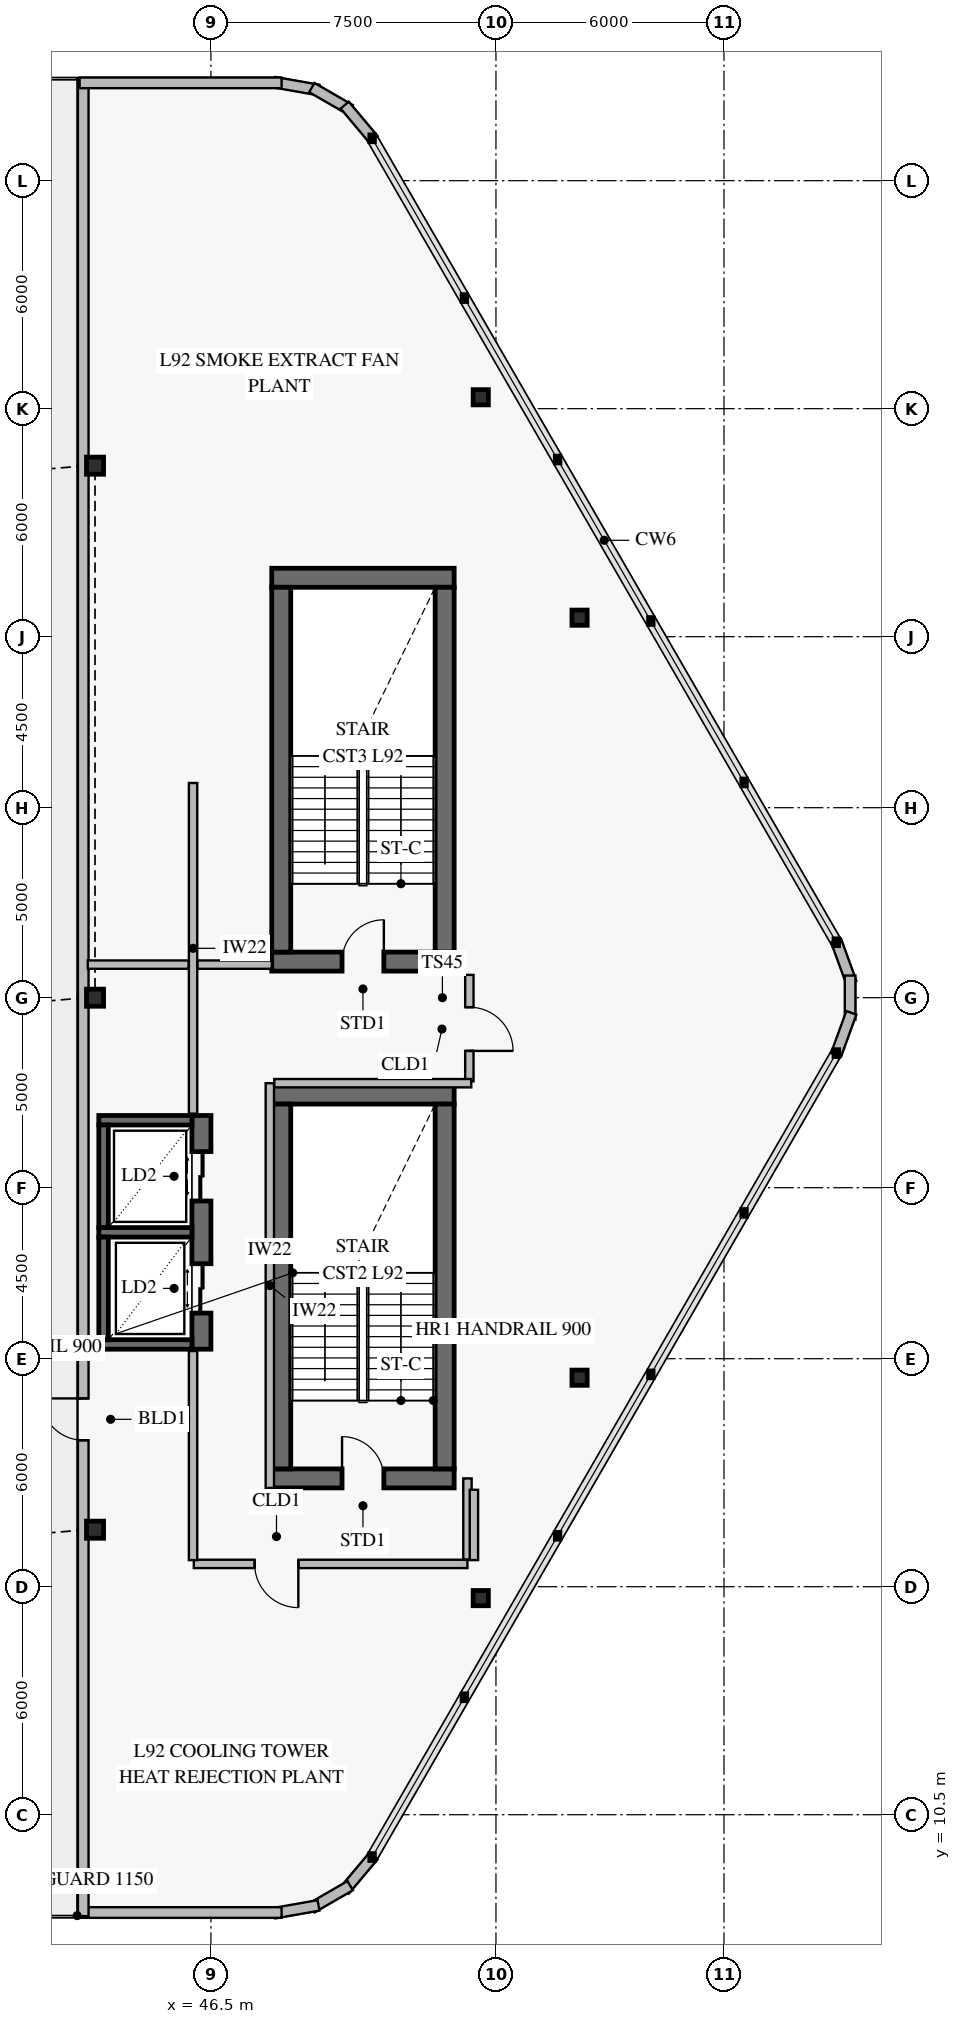
"""IFC4 building model, lengths in metres.
Left out: names, types, materials, properties, quantities, classifications, styles, units other than length and angle.
Written with IfcOpenShell. Run it as: python <this file> out.ifc"""

import sys

from ifc_helpers import new_model, si_unit, direction, frame, frame_2d, origin, origin_2d, place, context, subcontext, project, spatial, rectangle, hollow_rectangle, i_section, extrude, element, fill, save


model = new_model("IFC4")
c1 = context("Model", 3, precision=1e-05, world=origin(), true_north=direction((0.0, 1.0)))
c2 = subcontext(c1, "Body", "Model", "MODEL_VIEW")
j1 = project(units=[si_unit("LENGTHUNIT", "METRE"), si_unit("PLANEANGLEUNIT", "RADIAN")], contexts=[c1])
p1 = place(None, origin())
s1 = spatial("IfcSite", under=j1, at=p1, CompositionType="ELEMENT")
p2 = place(p1, origin())
s2 = spatial("IfcBuilding", under=s1, at=p2, CompositionType="ELEMENT")
p3 = place(p2, frame((0.0, 0.0, 361.4)))
s3 = spatial("IfcBuildingStorey", under=s2, at=p3, CompositionType="ELEMENT", Elevation=361.4)
p4 = place(p3, frame((48.1, 19.35, 0.0), z_axis=(0.0, 0.0, 1.0), x_axis=(1.0, 0.0, 0.0)))
e1 = element("IfcWall", 1, at=p4, inside=s3, PredefinedType="SHEAR", context=c2, shape_type="SweptSolid", body=[
    extrude(rectangle(XDim=4.8, YDim=0.5, at=frame_2d((2.4, 0.0))), origin(), (0.0, 0.0, 1.0), 4.4),
])
p5 = place(p4, frame((1.85, 0.0, 0.0)))
e2 = element("IfcOpeningElement", 2, at=p5, cuts=e1, PredefinedType="OPENING", context=c2, shape_type="SweptSolid", body=[
    extrude(rectangle(XDim=1.1, YDim=2.15, at=frame_2d((0.55, 1.075))), frame((0.0, 0.262, 0.0), z_axis=(0.0, -1.0, 0.0), x_axis=(1.0, 0.0, 0.0)), (0.0, 0.0, 1.0), 0.524),
])
p6 = place(p3, frame((52.9, 29.45, 0.0), z_axis=(0.0, 0.0, 1.0), x_axis=(-1.0, 0.0, 0.0)))
e3 = element("IfcWall", 3, at=p6, inside=s3, PredefinedType="SHEAR", context=c2, shape_type="SweptSolid", body=[
    extrude(rectangle(XDim=4.8, YDim=0.5, at=frame_2d((2.4, 0.0))), origin(), (0.0, 0.0, 1.0), 4.4),
])
for number, where, z_axis, x_axis in (
    (4, (48.35, 19.6, 0.0), (0.0, 0.0, 1.0), (0.0, 1.0, 0.0)),
    (5, (52.65, 29.2, 0.0), (0.0, 0.0, 1.0), (0.0, -1.0, 0.0)),
):
    element("IfcWall", number, at=place(p3, frame(where, z_axis=z_axis, x_axis=x_axis)), inside=s3, PredefinedType="SHEAR", context=c2, shape_type="SweptSolid", body=[
        extrude(rectangle(XDim=9.6, YDim=0.5, at=frame_2d((4.8, 0.0))), origin(), (0.0, 0.0, 1.0), 4.4),
    ])
p7 = place(p3, frame((48.1, 32.95, 0.0), z_axis=(0.0, 0.0, 1.0), x_axis=(1.0, 0.0, 0.0)))
e6 = element("IfcWall", 6, at=p7, inside=s3, PredefinedType="SHEAR", context=c2, shape_type="SweptSolid", body=[
    extrude(rectangle(XDim=4.8, YDim=0.5, at=frame_2d((2.4, 0.0))), origin(), (0.0, 0.0, 1.0), 4.4),
])
p8 = place(p7, frame((1.85, 0.0, 0.0)))
e7 = element("IfcOpeningElement", 7, at=p8, cuts=e6, PredefinedType="OPENING", context=c2, shape_type="SweptSolid", body=[
    extrude(rectangle(XDim=1.1, YDim=2.15, at=frame_2d((0.55, 1.075))), frame((0.0, 0.262, 0.0), z_axis=(0.0, -1.0, 0.0), x_axis=(1.0, 0.0, 0.0)), (0.0, 0.0, 1.0), 0.524),
])
p9 = place(p3, frame((52.9, 43.05, 0.0), z_axis=(0.0, 0.0, 1.0), x_axis=(-1.0, 0.0, 0.0)))
e8 = element("IfcWall", 8, at=p9, inside=s3, PredefinedType="SHEAR", context=c2, shape_type="SweptSolid", body=[
    extrude(rectangle(XDim=4.8, YDim=0.5, at=frame_2d((2.4, 0.0))), origin(), (0.0, 0.0, 1.0), 4.4),
])
for number, where, z_axis, x_axis in (
    (9, (48.35, 33.2, 0.0), (0.0, 0.0, 1.0), (0.0, 1.0, 0.0)),
    (10, (52.65, 42.8, 0.0), (0.0, 0.0, 1.0), (0.0, -1.0, 0.0)),
):
    element("IfcWall", number, at=place(p3, frame(where, z_axis=z_axis, x_axis=x_axis)), inside=s3, PredefinedType="SHEAR", context=c2, shape_type="SweptSolid", body=[
        extrude(rectangle(XDim=9.6, YDim=0.5, at=frame_2d((4.8, 0.0))), origin(), (0.0, 0.0, 1.0), 4.4),
    ])
p10 = place(p3, frame((46.25, 22.75, 0.0), z_axis=(0.0, 0.0, 1.0), x_axis=(0.0, 1.0, 0.0)))
e11 = element("IfcWall", 11, at=p10, inside=s3, PredefinedType="SHEAR", context=c2, shape_type="SweptSolid", body=[
    extrude(rectangle(XDim=6.15, YDim=0.5, at=frame_2d((3.075, 0.0))), origin(), (0.0, 0.0, 1.0), 4.4),
])
p11 = place(p10, frame((0.95, 0.0, 0.0)))
e12 = element("IfcOpeningElement", 12, at=p11, cuts=e11, PredefinedType="OPENING", context=c2, shape_type="SweptSolid", body=[
    extrude(rectangle(XDim=1.3, YDim=2.3, at=frame_2d((0.65, 1.15))), frame((0.0, 0.262, 0.0), z_axis=(0.0, -1.0, 0.0), x_axis=(1.0, 0.0, 0.0)), (0.0, 0.0, 1.0), 0.524),
])
p12 = place(p10, frame((3.9, 0.0, 0.0)))
e13 = element("IfcOpeningElement", 13, at=p12, cuts=e11, PredefinedType="OPENING", context=c2, shape_type="SweptSolid", body=[
    extrude(rectangle(XDim=1.3, YDim=2.3, at=frame_2d((0.65, 1.15))), frame((0.0, 0.262, 0.0), z_axis=(0.0, -1.0, 0.0), x_axis=(1.0, 0.0, 0.0)), (0.0, 0.0, 1.0), 0.524),
])
for number, where, z_axis, x_axis in (
    (14, (56.2, 22.0, 0.0), (0.0, 0.0, 1.0), (1.0, 0.0, 0.0)),
    (15, (56.2, 42.0, 0.0), (0.0, 0.0, 1.0), (1.0, 0.0, 0.0)),
    (16, (53.6, 16.2, 0.0), (0.0, 0.0, 1.0), (1.0, 0.0, 0.0)),
    (17, (53.6, 47.8, 0.0), (0.0, 0.0, 1.0), (1.0, 0.0, 0.0)),
):
    element("IfcColumn", number, at=place(p3, frame(where, z_axis=z_axis, x_axis=x_axis)), inside=s3, PredefinedType="COLUMN", context=c2, shape_type="SweptSolid", body=[
        extrude(i_section(OverallWidth=0.4, OverallDepth=0.4, WebThickness=0.013, FlangeThickness=0.021, at=origin_2d()), origin(), (0.0, 0.0, 1.0), 4.05),
    ])
for number, where, z_axis, x_axis in (
    (18, (43.45, 18.0, 0.0), (0.0, 0.0, 1.0), (1.0, 0.0, 0.0)),
    (19, (43.45, 32.0, 0.0), (0.0, 0.0, 1.0), (1.0, 0.0, 0.0)),
    (20, (43.45, 46.0, 0.0), (0.0, 0.0, 1.0), (1.0, 0.0, 0.0)),
):
    element("IfcColumn", number, at=place(p3, frame(where, z_axis=z_axis, x_axis=x_axis)), inside=s3, PredefinedType="PILASTER", context=c2, shape_type="SweptSolid", body=[
        extrude(hollow_rectangle(XDim=0.45, YDim=0.45, WallThickness=0.022, at=origin_2d()), origin(), (0.0, 0.0, 1.0), 4.05),
    ])
p13 = place(p3, frame((48.171, 56.091, 0.0), z_axis=(0.0, 0.0, 1.0), x_axis=(0.984798162481, -0.173702559495, 0.0)))
e21 = element("IfcWall", 21, at=p13, inside=s3, PredefinedType="SOLIDWALL", context=c2, shape_type="SweptSolid", body=[
    extrude(rectangle(XDim=1.178, YDim=0.28, at=frame_2d((0.589, 0.0))), origin(), (0.0, 0.0, 1.0), 4.05),
])
p14 = place(p3, frame((49.155, 55.95, 0.0), z_axis=(0.0, 0.0, 1.0), x_axis=(0.865951785477, -0.500127488975, 0.0)))
e22 = element("IfcWall", 22, at=p14, inside=s3, PredefinedType="SOLIDWALL", context=c2, shape_type="SweptSolid", body=[
    extrude(rectangle(XDim=1.165, YDim=0.28, at=frame_2d((0.583, 0.0))), origin(), (0.0, 0.0, 1.0), 4.05),
])
for number, where, z_axis, x_axis in (
    (23, (50.021, 55.488, 0.0), (0.0, 0.0, 1.0), (0.643, -0.766, 0.0)),
    (24, (62.948, 33.505, 0.0), (0.0, 0.0, 1.0), (0.342, -0.94, 0.0)),
):
    element("IfcWall", number, at=place(p3, frame(where, z_axis=z_axis, x_axis=x_axis)), inside=s3, PredefinedType="SOLIDWALL", context=c2, shape_type="SweptSolid", body=[
        extrude(rectangle(XDim=1.178, YDim=0.28, at=frame_2d((0.589, 0.0))), origin(), (0.0, 0.0, 1.0), 4.05),
    ])
p15 = place(p3, frame((63.319, 32.583, 0.0), z_axis=(0.0, 0.0, 1.0), x_axis=(0.0, -1.0, 0.0)))
e25 = element("IfcWall", 25, at=p15, inside=s3, PredefinedType="SOLIDWALL", context=c2, shape_type="SweptSolid", body=[
    extrude(rectangle(XDim=1.165, YDim=0.28, at=frame_2d((0.583, 0.0))), origin(), (0.0, 0.0, 1.0), 4.05),
])
for number, where, z_axis, x_axis in (
    (26, (63.351, 31.602, 0.0), (0.0, 0.0, 1.0), (-0.342, -0.94, 0.0)),
    (27, (50.778, 9.414, 0.0), (0.0, 0.0, 1.0), (-0.643, -0.766, 0.0)),
):
    element("IfcWall", number, at=place(p3, frame(where, z_axis=z_axis, x_axis=x_axis)), inside=s3, PredefinedType="SOLIDWALL", context=c2, shape_type="SweptSolid", body=[
        extrude(rectangle(XDim=1.178, YDim=0.28, at=frame_2d((0.589, 0.0))), origin(), (0.0, 0.0, 1.0), 4.05),
    ])
p16 = place(p3, frame((50.164, 8.633, 0.0), z_axis=(0.0, 0.0, 1.0), x_axis=(-0.865951785477, -0.500127488975, 0.0)))
e28 = element("IfcWall", 28, at=p16, inside=s3, PredefinedType="SOLIDWALL", context=c2, shape_type="SweptSolid", body=[
    extrude(rectangle(XDim=1.165, YDim=0.28, at=frame_2d((0.583, 0.0))), origin(), (0.0, 0.0, 1.0), 4.05),
])
p17 = place(p3, frame((49.331, 8.114, 0.0), z_axis=(0.0, 0.0, 1.0), x_axis=(-0.984798162481, -0.173702559495, 0.0)))
e29 = element("IfcWall", 29, at=p17, inside=s3, PredefinedType="SOLIDWALL", context=c2, shape_type="SweptSolid", body=[
    extrude(rectangle(XDim=1.178, YDim=0.28, at=frame_2d((0.589, 0.0))), origin(), (0.0, 0.0, 1.0), 4.05),
])
p18 = place(p3, frame((48.36, 7.926, 0.0), z_axis=(0.0, 0.0, 1.0), x_axis=(-1.0, 0.0, 0.0)))
e30 = element("IfcWall", 30, at=p18, inside=s3, PredefinedType="SOLIDWALL", context=c2, shape_type="SweptSolid", body=[
    extrude(rectangle(XDim=5.315, YDim=0.28, at=frame_2d((2.657, 0.0))), origin(), (0.0, 0.0, 1.0), 4.05),
])
p19 = place(p3, frame((43.14, 7.831, 0.0), z_axis=(0.0, 0.0, 1.0), x_axis=(0.0, 1.0, 0.0)))
e31 = element("IfcWall", 31, at=p19, inside=s3, PredefinedType="SOLIDWALL", context=c2, shape_type="SweptSolid", body=[
    extrude(rectangle(XDim=48.338, YDim=0.28, at=frame_2d((24.169, 0.0))), origin(), (0.0, 0.0, 1.0), 3.465),
])
p20 = place(p19, frame((12.524, 0.0, 0.0)))
e32 = element("IfcOpeningElement", 32, at=p20, cuts=e31, PredefinedType="OPENING", context=c2, shape_type="SweptSolid", body=[
    extrude(rectangle(XDim=1.1, YDim=2.2, at=frame_2d((0.55, 1.1))), frame((0.0, 0.152, 0.0), z_axis=(0.0, -1.0, 0.0), x_axis=(1.0, 0.0, 0.0)), (0.0, 0.0, 1.0), 0.304),
])
p21 = place(p3, frame((43.045, 56.074, 0.0), z_axis=(0.0, 0.0, 1.0), x_axis=(1.0, 0.0, 0.0)))
e33 = element("IfcWall", 33, at=p21, inside=s3, PredefinedType="SOLIDWALL", context=c2, shape_type="SweptSolid", body=[
    extrude(rectangle(XDim=5.315, YDim=0.28, at=frame_2d((2.657, 0.0))), origin(), (0.0, 0.0, 1.0), 4.05),
])
for number, where, z_axis, x_axis in (
    (34, (43.55, 22.875, 0.0), (0.0, 0.0, 1.0), (1.0, 0.0, 0.0)),
    (35, (43.55, 25.825, 0.0), (0.0, 0.0, 1.0), (1.0, 0.0, 0.0)),
):
    element("IfcWall", number, at=place(p3, frame(where, z_axis=z_axis, x_axis=x_axis)), inside=s3, PredefinedType="SOLIDWALL", context=c2, shape_type="SweptSolid", body=[
        extrude(rectangle(XDim=2.45, YDim=0.25, at=frame_2d((1.225, 0.0))), origin(), (0.0, 0.0, 1.0), 4.4),
    ])
p22 = place(p3, frame((43.675, 23.0, 0.0), z_axis=(0.0, 0.0, 1.0), x_axis=(0.0, 1.0, 0.0)))
e36 = element("IfcWall", 36, at=p22, inside=s3, PredefinedType="SOLIDWALL", context=c2, shape_type="SweptSolid", body=[
    extrude(rectangle(XDim=2.7, YDim=0.25, at=frame_2d((1.35, 0.0))), origin(), (0.0, 0.0, 1.0), 4.4),
])
p23 = place(p3, frame((43.55, 28.775, 0.0), z_axis=(0.0, 0.0, 1.0), x_axis=(1.0, 0.0, 0.0)))
e37 = element("IfcWall", 37, at=p23, inside=s3, PredefinedType="SOLIDWALL", context=c2, shape_type="SweptSolid", body=[
    extrude(rectangle(XDim=2.45, YDim=0.25, at=frame_2d((1.225, 0.0))), origin(), (0.0, 0.0, 1.0), 4.4),
])
p24 = place(p3, frame((43.675, 25.95, 0.0), z_axis=(0.0, 0.0, 1.0), x_axis=(0.0, 1.0, 0.0)))
e38 = element("IfcWall", 38, at=p24, inside=s3, PredefinedType="SOLIDWALL", context=c2, shape_type="SweptSolid", body=[
    extrude(rectangle(XDim=2.7, YDim=0.25, at=frame_2d((1.35, 0.0))), origin(), (0.0, 0.0, 1.0), 4.4),
])
p25 = place(p3, frame((46.05, 17.1, 0.0), z_axis=(0.0, 0.0, 1.0), x_axis=(1.0, 0.0, 0.0)))
e39 = element("IfcWall", 39, at=p25, inside=s3, PredefinedType="PARTITIONING", context=c2, shape_type="SweptSolid", body=[
    extrude(rectangle(XDim=7.2, YDim=0.22, at=frame_2d((3.6, 0.0))), origin(), (0.0, 0.0, 1.0), 3.47),
])
p26 = place(p25, frame((1.6, 0.0, 0.0)))
e40 = element("IfcOpeningElement", 40, at=p26, cuts=e39, PredefinedType="OPENING", context=c2, shape_type="SweptSolid", body=[
    extrude(rectangle(XDim=1.15, YDim=2.2, at=frame_2d((0.575, 1.1))), frame((0.0, 0.122, 0.0), z_axis=(0.0, -1.0, 0.0), x_axis=(1.0, 0.0, 0.0)), (0.0, 0.0, 1.0), 0.244),
])
p27 = place(p3, frame((53.3, 29.8, 0.0), z_axis=(0.0, 0.0, 1.0), x_axis=(0.0, 1.0, 0.0)))
e41 = element("IfcWall", 41, at=p27, inside=s3, PredefinedType="PARTITIONING", context=c2, shape_type="SweptSolid", body=[
    extrude(rectangle(XDim=2.8, YDim=0.22, at=frame_2d((1.4, 0.0))), origin(), (0.0, 0.0, 1.0), 4.05),
])
p28 = place(p27, frame((0.8, 0.0, 0.0)))
e42 = element("IfcOpeningElement", 42, at=p28, cuts=e41, PredefinedType="OPENING", context=c2, shape_type="SweptSolid", body=[
    extrude(rectangle(XDim=1.15, YDim=2.2, at=frame_2d((0.575, 1.1))), frame((0.0, 0.122, 0.0), z_axis=(0.0, -1.0, 0.0), x_axis=(1.0, 0.0, 0.0)), (0.0, 0.0, 1.0), 0.244),
])
p29 = place(p3, frame((53.25, 17.218, 0.0), z_axis=(0.0, 0.0, 1.0), x_axis=(0.0, 1.0, 0.0)))
e43 = element("IfcWall", 43, at=p29, inside=s3, PredefinedType="PARTITIONING", context=c2, shape_type="SweptSolid", body=[
    extrude(rectangle(XDim=2.132, YDim=0.22, at=frame_2d((1.066, 0.0))), origin(), (0.0, 0.0, 1.0), 4.05),
])
p30 = place(p3, frame((48.05, 19.1, 0.0), z_axis=(0.0, 0.0, 1.0), x_axis=(0.0, 1.0, 0.0)))
e44 = element("IfcWall", 44, at=p30, inside=s3, PredefinedType="PARTITIONING", context=c2, shape_type="SweptSolid", body=[
    extrude(rectangle(XDim=10.65, YDim=0.22, at=frame_2d((5.325, 0.0))), origin(), (0.0, 0.0, 1.0), 3.47),
])
p31 = place(p3, frame((48.168, 29.75, 0.0), z_axis=(0.0, 0.0, 1.0), x_axis=(1.0, 0.0, 0.0)))
e45 = element("IfcWall", 45, at=p31, inside=s3, PredefinedType="PARTITIONING", context=c2, shape_type="SweptSolid", body=[
    extrude(rectangle(XDim=5.182, YDim=0.22, at=frame_2d((2.591, 0.0))), origin(), (0.0, 0.0, 1.0), 4.05),
])
p32 = place(p3, frame((46.03, 22.701, 0.0), z_axis=(0.0, 0.0, 1.0), x_axis=(0.0, -1.0, 0.0)))
e46 = element("IfcWall", 46, at=p32, inside=s3, PredefinedType="PARTITIONING", context=c2, shape_type="SweptSolid", body=[
    extrude(rectangle(XDim=5.501, YDim=0.22, at=frame_2d((2.751, 0.0))), origin(), (0.0, 0.0, 1.0), 3.47),
])
p33 = place(p3, frame((53.42, 17.2, 0.0), z_axis=(0.0, 0.0, 1.0), x_axis=(0.0, 1.0, 0.0)))
e47 = element("IfcWall", 47, at=p33, inside=s3, PredefinedType="PARTITIONING", context=c2, shape_type="SweptSolid", body=[
    extrude(rectangle(XDim=1.85, YDim=0.22, at=frame_2d((0.925, 0.0))), origin(), (0.0, 0.0, 1.0), 4.05),
])
p34 = place(p3, frame((46.03, 37.65, 0.0), z_axis=(0.0, 0.0, 1.0), x_axis=(0.0, -1.0, 0.0)))
e48 = element("IfcWall", 48, at=p34, inside=s3, PredefinedType="PARTITIONING", context=c2, shape_type="SweptSolid", body=[
    extrude(rectangle(XDim=8.701, YDim=0.22, at=frame_2d((4.351, 0.0))), origin(), (0.0, 0.0, 1.0), 4.05),
])
p35 = place(p3, frame((48.1, 32.87, 0.0), z_axis=(0.0, 0.0, 1.0), x_axis=(-1.0, 0.0, 0.0)))
e49 = element("IfcWall", 49, at=p35, inside=s3, PredefinedType="PARTITIONING", context=c2, shape_type="SweptSolid", body=[
    extrude(rectangle(XDim=1.952, YDim=0.22, at=frame_2d((0.976, 0.0))), origin(), (0.0, 0.0, 1.0), 4.05),
])
p36 = place(p3, frame((45.912, 32.87, 0.0), z_axis=(0.0, 0.0, 1.0), x_axis=(-1.0, 0.0, 0.0)))
e50 = element("IfcWall", 50, at=p36, inside=s3, PredefinedType="PARTITIONING", context=c2, shape_type="SweptSolid", body=[
    extrude(rectangle(XDim=2.652, YDim=0.22, at=frame_2d((1.326, 0.0))), origin(), (0.0, 0.0, 1.0), 3.47),
])
p37 = place(p20, origin())
e51 = element("IfcDoor", 51, at=p37, inside=s3, OperationType="SINGLE_SWING_RIGHT", PredefinedType="DOOR", context=c2, shape_type="SweptSolid", body=[
    extrude(rectangle(XDim=1.1, YDim=2.2, at=frame_2d((0.55, 1.1))), frame((0.0, 0.025, 0.0), z_axis=(0.0, -1.0, 0.0), x_axis=(1.0, 0.0, 0.0)), (0.0, 0.0, 1.0), 0.05),
])
fill(e32, e51)
p38 = place(p5, origin())
e52 = element("IfcDoor", 52, at=p38, inside=s3, OperationType="SINGLE_SWING_LEFT", PredefinedType="USERDEFINED", context=c2, shape_type="SweptSolid", body=[
    extrude(rectangle(XDim=1.1, YDim=2.15, at=frame_2d((0.55, 1.075))), frame((0.0, 0.025, 0.0), z_axis=(0.0, -1.0, 0.0), x_axis=(1.0, 0.0, 0.0)), (0.0, 0.0, 1.0), 0.05),
])
fill(e2, e52)
p39 = place(p8, origin())
e53 = element("IfcDoor", 53, at=p39, inside=s3, OperationType="SINGLE_SWING_RIGHT", PredefinedType="USERDEFINED", context=c2, shape_type="SweptSolid", body=[
    extrude(rectangle(XDim=1.1, YDim=2.15, at=frame_2d((0.55, 1.075))), frame((0.0, 0.025, 0.0), z_axis=(0.0, -1.0, 0.0), x_axis=(1.0, 0.0, 0.0)), (0.0, 0.0, 1.0), 0.05),
])
fill(e7, e53)
p40 = place(p11, frame((1.3, 0.0, 0.0), z_axis=(0.0, 0.0, 1.0), x_axis=(-1.0, 0.0, 0.0)))
e54 = element("IfcDoor", 54, at=p40, inside=s3, OperationType="DOUBLE_DOOR_SLIDING", PredefinedType="DOOR", context=c2, shape_type="SweptSolid", body=[
    extrude(rectangle(XDim=1.3, YDim=2.3, at=frame_2d((0.65, 1.15))), frame((0.0, 0.025, 0.0), z_axis=(0.0, -1.0, 0.0), x_axis=(1.0, 0.0, 0.0)), (0.0, 0.0, 1.0), 0.05),
])
fill(e12, e54)
p41 = place(p12, frame((1.3, 0.0, 0.0), z_axis=(0.0, 0.0, 1.0), x_axis=(-1.0, 0.0, 0.0)))
e55 = element("IfcDoor", 55, at=p41, inside=s3, OperationType="DOUBLE_DOOR_SLIDING", PredefinedType="DOOR", context=c2, shape_type="SweptSolid", body=[
    extrude(rectangle(XDim=1.3, YDim=2.3, at=frame_2d((0.65, 1.15))), frame((0.0, 0.025, 0.0), z_axis=(0.0, -1.0, 0.0), x_axis=(1.0, 0.0, 0.0)), (0.0, 0.0, 1.0), 0.05),
])
fill(e13, e55)
p42 = place(p26, frame((1.15, 0.0, 0.0), z_axis=(0.0, 0.0, 1.0), x_axis=(-1.0, 0.0, 0.0)))
e56 = element("IfcDoor", 56, at=p42, inside=s3, OperationType="SINGLE_SWING_LEFT", PredefinedType="DOOR", context=c2, shape_type="SweptSolid", body=[
    extrude(rectangle(XDim=1.15, YDim=2.2, at=frame_2d((0.575, 1.1))), frame((0.0, 0.025, 0.0), z_axis=(0.0, -1.0, 0.0), x_axis=(1.0, 0.0, 0.0)), (0.0, 0.0, 1.0), 0.05),
])
fill(e40, e56)
p43 = place(p28, frame((1.15, 0.0, 0.0), z_axis=(0.0, 0.0, 1.0), x_axis=(-1.0, 0.0, 0.0)))
e57 = element("IfcDoor", 57, at=p43, inside=s3, OperationType="SINGLE_SWING_RIGHT", PredefinedType="DOOR", context=c2, shape_type="SweptSolid", body=[
    extrude(rectangle(XDim=1.15, YDim=2.2, at=frame_2d((0.575, 1.1))), frame((0.0, 0.025, 0.0), z_axis=(0.0, -1.0, 0.0), x_axis=(1.0, 0.0, 0.0)), (0.0, 0.0, 1.0), 0.05),
])
fill(e42, e57)
save(model, sys.argv[1])
